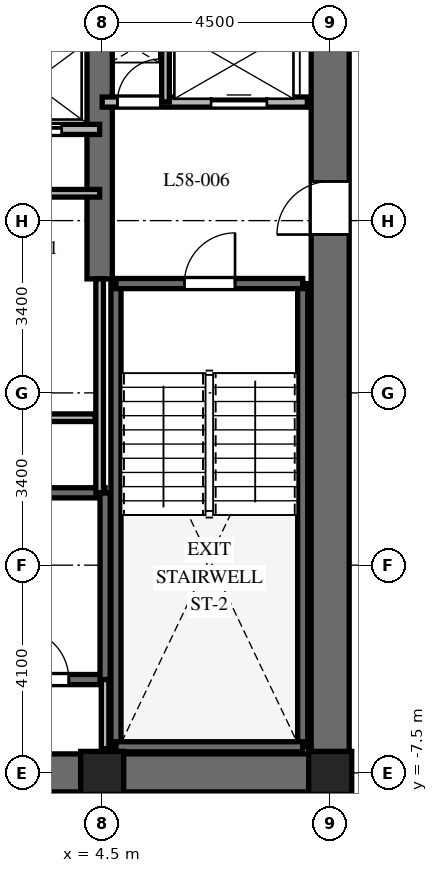
"""IFC4 building model, lengths in metres.
Left out: names, types, materials, properties, quantities, classifications, styles, units other than length and angle.
Written with IfcOpenShell. Run it as: python <this file> out.ifc"""

import sys

from ifc_helpers import new_model, si_unit, direction, frame, frame_2d, origin, origin_2d, place, context, subcontext, project, spatial, rectangle, extrude, element, fill, save


model = new_model("IFC4")
c1 = context("Model", 3, precision=1e-05, world=origin(), true_north=direction((0.0, 1.0)))
c2 = subcontext(c1, "Body", "Model", "MODEL_VIEW")
j1 = project(units=[si_unit("LENGTHUNIT", "METRE"), si_unit("PLANEANGLEUNIT", "RADIAN")], contexts=[c1])
p1 = place(None, origin())
s1 = spatial("IfcSite", under=j1, at=p1, CompositionType="ELEMENT")
p2 = place(p1, origin())
s2 = spatial("IfcBuilding", under=s1, at=p2, CompositionType="ELEMENT")
p3 = place(p2, frame((0.0, 0.0, 233.1)))
s3 = spatial("IfcBuildingStorey", under=s2, at=p3, CompositionType="ELEMENT", Elevation=233.1)
p4 = place(p3, frame((-9.375, -7.5, 0.0), z_axis=(0.0, 0.0, 1.0), x_axis=(1.0, 0.0, 0.0)))
e1 = element("IfcWall", 1, at=p4, inside=s3, PredefinedType="SHEAR", context=c2, shape_type="SweptSolid", body=[
    extrude(rectangle(XDim=18.75, YDim=0.75, at=frame_2d((9.375, 0.0))), origin(), (0.0, 0.0, 1.0), 3.8),
])
p5 = place(p4, frame((9.425, 0.0, 0.0)))
e2 = element("IfcOpeningElement", 2, at=p5, cuts=e1, PredefinedType="OPENING", context=c2, shape_type="SweptSolid", body=[
    extrude(rectangle(XDim=1.0, YDim=2.15, at=frame_2d((0.5, 1.075))), frame((0.0, 0.385, 0.0), z_axis=(0.0, -1.0, 0.0), x_axis=(1.0, 0.0, 0.0)), (0.0, 0.0, 1.0), 0.77),
])
p6 = place(p3, frame((9.0, -7.125, 0.0), z_axis=(0.0, 0.0, 1.0), x_axis=(0.0, 1.0, 0.0)))
e3 = element("IfcWall", 3, at=p6, inside=s3, PredefinedType="SHEAR", context=c2, shape_type="SweptSolid", body=[
    extrude(rectangle(XDim=14.25, YDim=0.75, at=frame_2d((7.125, 0.0))), origin(), (0.0, 0.0, 1.0), 3.8),
])
p7 = place(p6, frame((10.25, 0.0, 0.0)))
e4 = element("IfcOpeningElement", 4, at=p7, cuts=e3, PredefinedType="OPENING", context=c2, shape_type="SweptSolid", body=[
    extrude(rectangle(XDim=1.05, YDim=2.15, at=frame_2d((0.525, 1.075))), frame((0.0, 0.385, 0.0), z_axis=(0.0, -1.0, 0.0), x_axis=(1.0, 0.0, 0.0)), (0.0, 0.0, 1.0), 0.77),
])
p8 = place(p3, frame((4.45, 2.25, 0.0), z_axis=(0.0, 0.0, 1.0), x_axis=(0.0, 1.0, 0.0)))
e5 = element("IfcWall", 5, at=p8, inside=s3, PredefinedType="SHEAR", context=c2, shape_type="SweptSolid", body=[
    extrude(rectangle(XDim=4.875, YDim=0.5, at=frame_2d((2.438, 0.0))), origin(), (0.0, 0.0, 1.0), 3.8),
])
for number, where, z_axis, x_axis in (
    (6, (4.772, -6.985, 0.0), (0.0, 0.0, 1.0), (0.0, 1.0, 0.0)),
    (7, (8.458, -6.985, 0.0), (0.0, 0.0, 1.0), (0.0, 1.0, 0.0)),
):
    element("IfcWall", number, at=place(p3, frame(where, z_axis=z_axis, x_axis=x_axis)), inside=s3, PredefinedType="SHEAR", context=c2, shape_type="SweptSolid", body=[
        extrude(rectangle(XDim=9.143, YDim=0.2, at=frame_2d((4.572, 0.0))), origin(), (0.0, 0.0, 1.0), 3.8),
    ])
p9 = place(p3, frame((4.772, -6.985, 0.0), z_axis=(0.0, 0.0, 1.0), x_axis=(1.0, 0.0, 0.0)))
e8 = element("IfcWall", 8, at=p9, inside=s3, PredefinedType="SHEAR", context=c2, shape_type="SweptSolid", body=[
    extrude(rectangle(XDim=3.686, YDim=0.2, at=frame_2d((1.843, 0.0))), origin(), (0.0, 0.0, 1.0), 3.8),
])
p10 = place(p3, frame((4.772, 2.158, 0.0), z_axis=(0.0, 0.0, 1.0), x_axis=(1.0, 0.0, 0.0)))
e9 = element("IfcWall", 9, at=p10, inside=s3, PredefinedType="SHEAR", context=c2, shape_type="SweptSolid", body=[
    extrude(rectangle(XDim=3.686, YDim=0.2, at=frame_2d((1.843, 0.0))), origin(), (0.0, 0.0, 1.0), 3.8),
])
p11 = place(p10, frame((1.35, 0.0, 0.0)))
e10 = element("IfcOpeningElement", 10, at=p11, cuts=e9, PredefinedType="OPENING", context=c2, shape_type="SweptSolid", body=[
    extrude(rectangle(XDim=1.0, YDim=2.15, at=frame_2d((0.5, 1.075))), frame((0.0, 0.11, 0.0), z_axis=(0.0, -1.0, 0.0), x_axis=(1.0, 0.0, 0.0)), (0.0, 0.0, 1.0), 0.22),
])
p12 = place(p3, frame((-4.608, -5.658, 0.0), z_axis=(0.0, 0.0, 1.0), x_axis=(1.0, 0.0, 0.0)))
e11 = element("IfcWall", 11, at=p12, inside=s3, PredefinedType="SHEAR", context=c2, shape_type="SweptSolid", body=[
    extrude(rectangle(XDim=9.166, YDim=0.2, at=frame_2d((4.583, 0.0))), origin(), (0.0, 0.0, 1.0), 3.8),
])
p13 = place(p12, frame((7.45, 0.0, 0.0)))
e12 = element("IfcOpeningElement", 12, at=p13, cuts=e11, PredefinedType="OPENING", context=c2, shape_type="SweptSolid", body=[
    extrude(rectangle(XDim=1.0, YDim=2.15, at=frame_2d((0.5, 1.075))), frame((0.0, 0.11, 0.0), z_axis=(0.0, -1.0, 0.0), x_axis=(1.0, 0.0, 0.0)), (0.0, 0.0, 1.0), 0.22),
])
p14 = place(p3, frame((-4.608, -1.972, 0.0), z_axis=(0.0, 0.0, 1.0), x_axis=(1.0, 0.0, 0.0)))
e13 = element("IfcWall", 13, at=p14, inside=s3, PredefinedType="SHEAR", context=c2, shape_type="SweptSolid", body=[
    extrude(rectangle(XDim=9.166, YDim=0.2, at=frame_2d((4.583, 0.0))), origin(), (0.0, 0.0, 1.0), 3.8),
])
p15 = place(p3, frame((4.558, -5.658, 0.0), z_axis=(0.0, 0.0, 1.0), x_axis=(0.0, 1.0, 0.0)))
e14 = element("IfcWall", 14, at=p15, inside=s3, PredefinedType="SHEAR", context=c2, shape_type="SweptSolid", body=[
    extrude(rectangle(XDim=3.686, YDim=0.2, at=frame_2d((1.843, 0.0))), origin(), (0.0, 0.0, 1.0), 3.8),
])
for number, where, z_axis, x_axis in (
    (15, (4.5, -7.5, 0.0), (0.0, 0.0, 1.0), (1.0, 0.0, 0.0)),
    (16, (9.0, -7.5, 0.0), (0.0, 0.0, 1.0), (1.0, 0.0, 0.0)),
):
    element("IfcColumn", number, at=place(p3, frame(where, z_axis=z_axis, x_axis=x_axis)), inside=s3, PredefinedType="COLUMN", context=c2, shape_type="SweptSolid", body=[
        extrude(rectangle(XDim=0.85, YDim=0.85, at=origin_2d()), origin(), (0.0, 0.0, 1.0), 3.8),
    ])
p16 = place(p3, frame((4.558, -7.02, 0.0), z_axis=(0.0, 0.0, 1.0), x_axis=(0.0, 1.0, 0.0)))
e17 = element("IfcWall", 17, at=p16, inside=s3, PredefinedType="PARTITIONING", context=c2, shape_type="SweptSolid", body=[
    extrude(rectangle(XDim=1.362, YDim=0.15, at=frame_2d((0.681, 0.0))), origin(), (0.0, 0.0, 1.0), 3.5),
])
p17 = place(p3, frame((4.5, 5.74, 0.0), z_axis=(0.0, 0.0, 1.0), x_axis=(1.0, 0.0, 0.0)))
e18 = element("IfcWall", 18, at=p17, inside=s3, PredefinedType="PARTITIONING", context=c2, shape_type="SweptSolid", body=[
    extrude(rectangle(XDim=4.05, YDim=0.2, at=frame_2d((2.025, 0.0))), origin(), (0.0, 0.0, 1.0), 3.5),
])
p18 = place(p17, frame((0.3, 0.0, 0.0)))
e19 = element("IfcOpeningElement", 19, at=p18, cuts=e18, PredefinedType="OPENING", context=c2, shape_type="SweptSolid", body=[
    extrude(rectangle(XDim=0.85, YDim=2.03, at=frame_2d((0.425, 1.015))), frame((0.0, 0.11, 0.0), z_axis=(0.0, -1.0, 0.0), x_axis=(1.0, 0.0, 0.0)), (0.0, 0.0, 1.0), 0.22),
])
p19 = place(p17, frame((2.15, 0.0, 0.0)))
e20 = element("IfcOpeningElement", 20, at=p19, cuts=e18, PredefinedType="OPENING", context=c2, shape_type="SweptSolid", body=[
    extrude(rectangle(XDim=1.1, YDim=2.2, at=frame_2d((0.55, 1.1))), frame((0.0, 0.11, 0.0), z_axis=(0.0, -1.0, 0.0), x_axis=(1.0, 0.0, 0.0)), (0.0, 0.0, 1.0), 0.22),
])
p20 = place(p3, frame((5.75, 5.74, 0.0), z_axis=(0.0, 0.0, 1.0), x_axis=(0.0, 1.0, 0.0)))
e21 = element("IfcWall", 21, at=p20, inside=s3, PredefinedType="PARTITIONING", context=c2, shape_type="SweptSolid", body=[
    extrude(rectangle(XDim=1.41, YDim=0.15, at=frame_2d((0.705, 0.0))), origin(), (0.0, 0.0, 1.0), 3.5),
])
p21 = place(p3, frame((1.85, 5.2, 0.0), z_axis=(0.0, 0.0, 1.0), x_axis=(1.0, 0.0, 0.0)))
e22 = element("IfcWall", 22, at=p21, inside=s3, PredefinedType="PARTITIONING", context=c2, shape_type="SweptSolid", body=[
    extrude(rectangle(XDim=2.6, YDim=0.2, at=frame_2d((1.3, 0.0))), origin(), (0.0, 0.0, 1.0), 3.5),
])
p22 = place(p21, frame((0.75, 0.0, 0.0)))
e23 = element("IfcOpeningElement", 23, at=p22, cuts=e22, PredefinedType="OPENING", context=c2, shape_type="SweptSolid", body=[
    extrude(rectangle(XDim=1.1, YDim=2.2, at=frame_2d((0.55, 1.1))), frame((0.0, 0.11, 0.0), z_axis=(0.0, -1.0, 0.0), x_axis=(1.0, 0.0, 0.0)), (0.0, 0.0, 1.0), 0.22),
])
p23 = place(p3, frame((4.45, -1.972, 0.0), z_axis=(0.0, 0.0, 1.0), x_axis=(0.0, 1.0, 0.0)))
e24 = element("IfcWall", 24, at=p23, inside=s3, PredefinedType="PARTITIONING", context=c2, shape_type="SweptSolid", body=[
    extrude(rectangle(XDim=4.222, YDim=0.15, at=frame_2d((2.111, 0.0))), origin(), (0.0, 0.0, 1.0), 3.5),
])
p24 = place(p3, frame((1.9, 3.94, 0.0), z_axis=(0.0, 0.0, 1.0), x_axis=(1.0, 0.0, 0.0)))
e25 = element("IfcWall", 25, at=p24, inside=s3, PredefinedType="PARTITIONING", context=c2, shape_type="SweptSolid", body=[
    extrude(rectangle(XDim=2.55, YDim=0.15, at=frame_2d((1.275, 0.0))), origin(), (0.0, 0.0, 1.0), 3.5),
])
p25 = place(p3, frame((-4.36, -0.49, 0.0), z_axis=(0.0, 0.0, 1.0), x_axis=(1.0, 0.0, 0.0)))
e26 = element("IfcWall", 26, at=p25, inside=s3, PredefinedType="PARTITIONING", context=c2, shape_type="SweptSolid", body=[
    extrude(rectangle(XDim=8.72, YDim=0.15, at=frame_2d((4.36, 0.0))), origin(), (0.0, 0.0, 1.0), 3.5),
])
p26 = place(p25, frame((3.86, 0.0, 0.0)))
e27 = element("IfcOpeningElement", 27, at=p26, cuts=e26, PredefinedType="OPENING", context=c2, shape_type="SweptSolid", body=[
    extrude(rectangle(XDim=0.9, YDim=2.03, at=frame_2d((0.45, 1.015))), frame((0.0, 0.085, 0.0), z_axis=(0.0, -1.0, 0.0), x_axis=(1.0, 0.0, 0.0)), (0.0, 0.0, 1.0), 0.17),
])
p27 = place(p11, origin())
e28 = element("IfcDoor", 28, at=p27, inside=s3, OperationType="SINGLE_SWING_RIGHT", PredefinedType="DOOR", context=c2, shape_type="SweptSolid", body=[
    extrude(rectangle(XDim=1.0, YDim=2.15, at=frame_2d((0.5, 1.075))), frame((0.0, 0.025, 0.0), z_axis=(0.0, -1.0, 0.0), x_axis=(1.0, 0.0, 0.0)), (0.0, 0.0, 1.0), 0.05),
])
fill(e10, e28)
p28 = place(p13, origin())
e29 = element("IfcDoor", 29, at=p28, inside=s3, OperationType="SINGLE_SWING_LEFT", PredefinedType="DOOR", context=c2, shape_type="SweptSolid", body=[
    extrude(rectangle(XDim=1.0, YDim=2.15, at=frame_2d((0.5, 1.075))), frame((0.0, 0.025, 0.0), z_axis=(0.0, -1.0, 0.0), x_axis=(1.0, 0.0, 0.0)), (0.0, 0.0, 1.0), 0.05),
])
fill(e12, e29)
p29 = place(p7, origin())
e30 = element("IfcDoor", 30, at=p29, inside=s3, OperationType="SINGLE_SWING_LEFT", PredefinedType="DOOR", context=c2, shape_type="SweptSolid", body=[
    extrude(rectangle(XDim=1.05, YDim=2.15, at=frame_2d((0.525, 1.075))), frame((0.0, 0.025, 0.0), z_axis=(0.0, -1.0, 0.0), x_axis=(1.0, 0.0, 0.0)), (0.0, 0.0, 1.0), 0.05),
])
fill(e4, e30)
p30 = place(p18, origin())
e31 = element("IfcDoor", 31, at=p30, inside=s3, OperationType="SINGLE_SWING_RIGHT", PredefinedType="DOOR", context=c2, shape_type="SweptSolid", body=[
    extrude(rectangle(XDim=0.85, YDim=2.03, at=frame_2d((0.425, 1.015))), frame((0.0, 0.025, 0.0), z_axis=(0.0, -1.0, 0.0), x_axis=(1.0, 0.0, 0.0)), (0.0, 0.0, 1.0), 0.05),
])
fill(e19, e31)
p31 = place(p19, origin())
e32 = element("IfcDoor", 32, at=p31, inside=s3, OperationType="SLIDING_TO_RIGHT", PredefinedType="DOOR", context=c2, shape_type="SweptSolid", body=[
    extrude(rectangle(XDim=1.1, YDim=2.2, at=frame_2d((0.55, 1.1))), frame((0.0, 0.025, 0.0), z_axis=(0.0, -1.0, 0.0), x_axis=(1.0, 0.0, 0.0)), (0.0, 0.0, 1.0), 0.05),
])
fill(e20, e32)
p32 = place(p22, origin())
e33 = element("IfcDoor", 33, at=p32, inside=s3, OperationType="SLIDING_TO_RIGHT", PredefinedType="DOOR", context=c2, shape_type="SweptSolid", body=[
    extrude(rectangle(XDim=1.1, YDim=2.2, at=frame_2d((0.55, 1.1))), frame((0.0, 0.025, 0.0), z_axis=(0.0, -1.0, 0.0), x_axis=(1.0, 0.0, 0.0)), (0.0, 0.0, 1.0), 0.05),
])
fill(e23, e33)
save(model, sys.argv[1])
